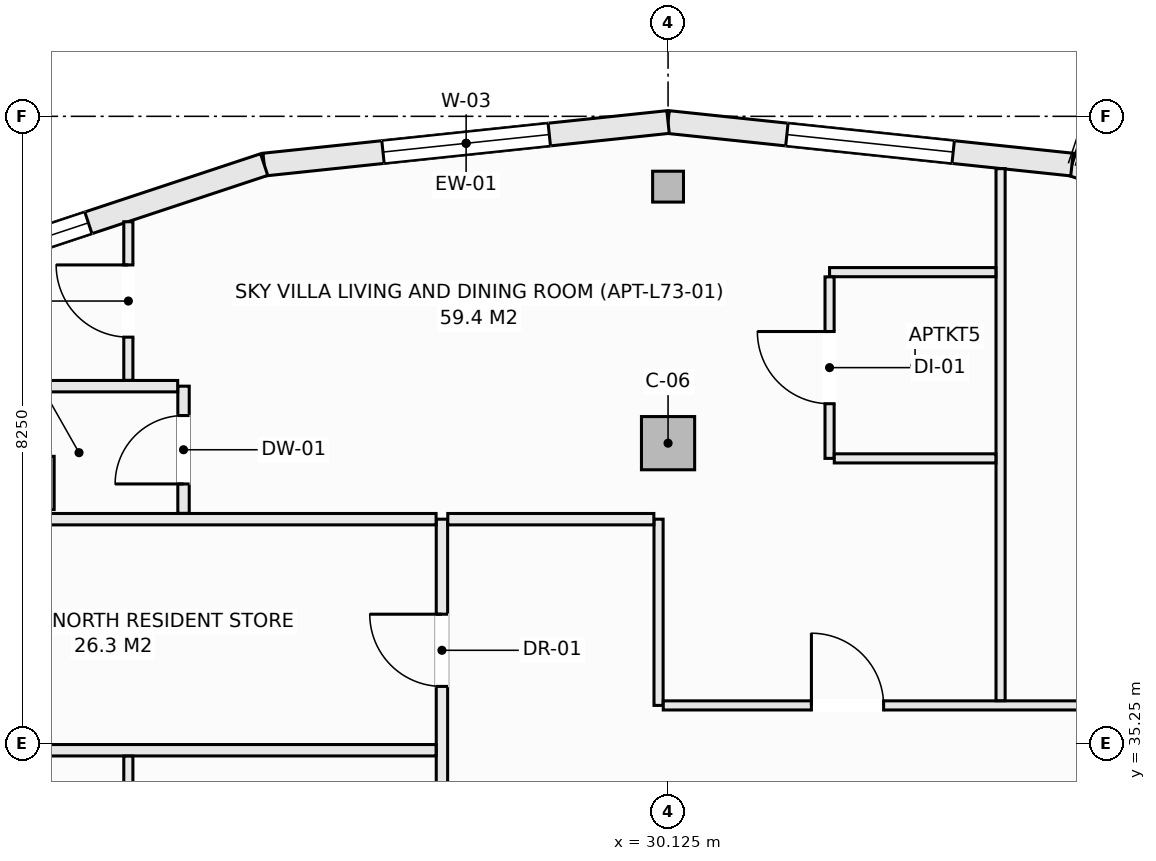
"""IFC4 building model, lengths in metres.
Left out: names, types, materials, properties, quantities, classifications, styles, units other than length and angle.
Written with IfcOpenShell. Run it as: python <this file> out.ifc"""

import sys

from ifc_helpers import new_model, si_unit, direction, frame, frame_2d, origin, origin_2d, place, context, subcontext, project, spatial, rectangle, hollow_rectangle, extrude, element, fill, save


model = new_model("IFC4")
c1 = context("Model", 3, precision=1e-05, world=origin(), true_north=direction((0.0, 1.0)))
c2 = subcontext(c1, "Body", "Model", "MODEL_VIEW")
j1 = project(units=[si_unit("LENGTHUNIT", "METRE"), si_unit("PLANEANGLEUNIT", "RADIAN")], contexts=[c1])
p1 = place(None, origin())
s1 = spatial("IfcSite", under=j1, at=p1, CompositionType="ELEMENT")
p2 = place(p1, origin())
s2 = spatial("IfcBuilding", under=s1, at=p2, CompositionType="ELEMENT")
p3 = place(p2, frame((0.0, 0.0, 269.0)))
s3 = spatial("IfcBuildingStorey", under=s2, at=p3, CompositionType="ELEMENT", Elevation=269.0)
p4 = place(p3, frame((30.125, 42.575, -0.27), z_axis=(0.0, 0.0, 1.0), x_axis=(1.0, 0.0, 0.0)))
e1 = element("IfcColumn", 1, at=p4, inside=s3, PredefinedType="COLUMN", context=c2, shape_type="SweptSolid", body=[
    extrude(hollow_rectangle(XDim=0.406, YDim=0.406, WallThickness=0.016, at=origin_2d()), origin(), (0.0, 0.0, 1.0), 3.3),
])
for number, where, z_axis, x_axis in (
    (2, (30.125, 39.2, -0.27), (0.0, 0.0, 1.0), (1.0, 0.0, 0.0)),
    (3, (21.698, 38.677, -0.27), (0.0, 0.0, 1.0), (1.0, 0.0, 0.0)),
):
    element("IfcColumn", number, at=place(p3, frame(where, z_axis=z_axis, x_axis=x_axis)), inside=s3, PredefinedType="COLUMN", context=c2, shape_type="SweptSolid", body=[
        extrude(rectangle(XDim=0.7, YDim=0.7, at=origin_2d()), origin(), (0.0, 0.0, 1.0), 3.3),
    ])
p5 = place(p3, frame((35.439, 42.865, 0.0), z_axis=(0.0, 0.0, 1.0), x_axis=(0.949252744709, -0.314514271001, 0.0)))
e4 = element("IfcWall", 4, at=p5, inside=s3, PredefinedType="SOLIDWALL", context=c2, shape_type="SweptSolid", body=[
    extrude(rectangle(XDim=5.216, YDim=0.3, at=frame_2d((2.608, 0.0))), origin(), (0.0, 0.0, 1.0), 2.605),
])
p6 = place(p5, frame((1.508, 0.0, 0.72)))
e5 = element("IfcOpeningElement", 5, at=p6, cuts=e4, PredefinedType="OPENING", context=c2, shape_type="SweptSolid", body=[
    extrude(rectangle(XDim=2.2, YDim=1.65, at=frame_2d((1.1, 0.825))), frame((0.0, 0.16, 0.0), z_axis=(0.0, -1.0, 0.0), x_axis=(1.0, 0.0, 0.0)), (0.0, 0.0, 1.0), 0.32),
])
p7 = place(p3, frame((30.125, 43.425, 0.0), z_axis=(0.0, 0.0, 1.0), x_axis=(0.9944966869, -0.104768028258, 0.0)))
e6 = element("IfcWall", 6, at=p7, inside=s3, PredefinedType="SOLIDWALL", context=c2, shape_type="SweptSolid", body=[
    extrude(rectangle(XDim=5.343, YDim=0.3, at=frame_2d((2.672, 0.0))), origin(), (0.0, 0.0, 1.0), 2.605),
])
p8 = place(p7, frame((1.572, 0.0, 0.72)))
e7 = element("IfcOpeningElement", 7, at=p8, cuts=e6, PredefinedType="OPENING", context=c2, shape_type="SweptSolid", body=[
    extrude(rectangle(XDim=2.2, YDim=1.65, at=frame_2d((1.1, 0.825))), frame((0.0, 0.16, 0.0), z_axis=(0.0, -1.0, 0.0), x_axis=(1.0, 0.0, 0.0)), (0.0, 0.0, 1.0), 0.32),
])
p9 = place(p3, frame((24.811, 42.865, 0.0), z_axis=(0.0, 0.0, 1.0), x_axis=(0.9944966869, 0.104768028258, 0.0)))
e8 = element("IfcWall", 8, at=p9, inside=s3, PredefinedType="SOLIDWALL", context=c2, shape_type="SweptSolid", body=[
    extrude(rectangle(XDim=5.343, YDim=0.3, at=frame_2d((2.672, 0.0))), origin(), (0.0, 0.0, 1.0), 2.605),
])
p10 = place(p9, frame((1.572, 0.0, 0.72)))
e9 = element("IfcOpeningElement", 9, at=p10, cuts=e8, PredefinedType="OPENING", context=c2, shape_type="SweptSolid", body=[
    extrude(rectangle(XDim=2.2, YDim=1.65, at=frame_2d((1.1, 0.825))), frame((0.0, 0.16, 0.0), z_axis=(0.0, -1.0, 0.0), x_axis=(1.0, 0.0, 0.0)), (0.0, 0.0, 1.0), 0.32),
])
p11 = place(p3, frame((19.859, 41.225, 0.0), z_axis=(0.0, 0.0, 1.0), x_axis=(0.949252744709, 0.314514271001, 0.0)))
e10 = element("IfcWall", 10, at=p11, inside=s3, PredefinedType="SOLIDWALL", context=c2, shape_type="SweptSolid", body=[
    extrude(rectangle(XDim=5.216, YDim=0.3, at=frame_2d((2.608, 0.0))), origin(), (0.0, 0.0, 1.0), 2.605),
])
p12 = place(p11, frame((1.58, 0.0, 0.72)))
e11 = element("IfcOpeningElement", 11, at=p12, cuts=e10, PredefinedType="OPENING", context=c2, shape_type="SweptSolid", body=[
    extrude(rectangle(XDim=1.2, YDim=1.65, at=frame_2d((0.6, 0.825))), frame((0.0, 0.16, 0.0), z_axis=(0.0, -1.0, 0.0), x_axis=(1.0, 0.0, 0.0)), (0.0, 0.0, 1.0), 0.32),
])
p13 = place(p3, frame((27.15, 34.002, 0.0), z_axis=(0.0, 0.0, 1.0), x_axis=(0.0, 1.0, 0.0)))
e12 = element("IfcWall", 12, at=p13, inside=s3, PredefinedType="PARTITIONING", context=c2, shape_type="SweptSolid", body=[
    extrude(rectangle(XDim=4.198, YDim=0.15, at=frame_2d((2.099, 0.0))), origin(), (0.0, 0.0, 1.0), 3.03),
])
p14 = place(p13, frame((1.998, 0.0, 0.0)))
e13 = element("IfcOpeningElement", 13, at=p14, cuts=e12, PredefinedType="OPENING", context=c2, shape_type="SweptSolid", body=[
    extrude(rectangle(XDim=0.95, YDim=2.1, at=frame_2d((0.475, 1.05))), frame((0.0, 0.085, 0.0), z_axis=(0.0, -1.0, 0.0), x_axis=(1.0, 0.0, 0.0)), (0.0, 0.0, 1.0), 0.17),
])
p15 = place(p3, frame((30.0, 35.75, 0.0), z_axis=(0.0, 0.0, 1.0), x_axis=(0.0, 1.0, 0.0)))
e14 = element("IfcWall", 14, at=p15, inside=s3, PredefinedType="PARTITIONING", context=c2, shape_type="SweptSolid", body=[
    extrude(rectangle(XDim=2.45, YDim=0.12, at=frame_2d((1.225, 0.0))), origin(), (0.0, 0.0, 1.0), 3.03),
])
p16 = place(p3, frame((18.5, 35.16, 0.0), z_axis=(0.0, 0.0, 1.0), x_axis=(1.0, 0.0, 0.0)))
e15 = element("IfcWall", 15, at=p16, inside=s3, PredefinedType="PARTITIONING", context=c2, shape_type="SweptSolid", body=[
    extrude(rectangle(XDim=8.573, YDim=0.15, at=frame_2d((4.287, 0.0))), origin(), (0.0, 0.0, 1.0), 3.03),
])
p17 = place(p3, frame((18.577, 38.2, 0.0), z_axis=(0.0, 0.0, 1.0), x_axis=(1.0, 0.0, 0.0)))
e16 = element("IfcWall", 16, at=p17, inside=s3, PredefinedType="PARTITIONING", context=c2, shape_type="SweptSolid", body=[
    extrude(rectangle(XDim=8.496, YDim=0.15, at=frame_2d((4.248, 0.0))), origin(), (0.0, 0.0, 1.0), 3.03),
])
p18 = place(p3, frame((27.227, 38.2, 0.0), z_axis=(0.0, 0.0, 1.0), x_axis=(1.0, 0.0, 0.0)))
e17 = element("IfcWall", 17, at=p18, inside=s3, PredefinedType="PARTITIONING", context=c2, shape_type="SweptSolid", body=[
    extrude(rectangle(XDim=2.711, YDim=0.15, at=frame_2d((1.355, 0.0))), origin(), (0.0, 0.0, 1.0), 3.03),
])
p19 = place(p3, frame((30.062, 35.75, 0.0), z_axis=(0.0, 0.0, 1.0), x_axis=(1.0, 0.0, 0.0)))
e18 = element("IfcWall", 18, at=p19, inside=s3, PredefinedType="PARTITIONING", context=c2, shape_type="SweptSolid", body=[
    extrude(rectangle(XDim=8.988, YDim=0.12, at=frame_2d((4.494, 0.0))), origin(), (0.0, 0.0, 1.0), 2.478),
])
p20 = place(p19, frame((5.473, 0.0, 0.0)))
e19 = element("IfcOpeningElement", 19, at=p20, cuts=e18, PredefinedType="OPENING", context=c2, shape_type="SweptSolid", body=[
    extrude(rectangle(XDim=0.95, YDim=2.1, at=frame_2d((0.475, 1.05))), frame((0.0, 0.07, 0.0), z_axis=(0.0, -1.0, 0.0), x_axis=(1.0, 0.0, 0.0)), (0.0, 0.0, 1.0), 0.14),
])
p21 = place(p19, frame((1.949, 0.0, 0.0)))
e20 = element("IfcOpeningElement", 20, at=p21, cuts=e18, PredefinedType="OPENING", context=c2, shape_type="SweptSolid", body=[
    extrude(rectangle(XDim=0.95, YDim=2.1, at=frame_2d((0.475, 1.05))), frame((0.0, 0.07, 0.0), z_axis=(0.0, -1.0, 0.0), x_axis=(1.0, 0.0, 0.0)), (0.0, 0.0, 1.0), 0.14),
])
p22 = place(p3, frame((34.5, 35.812, 0.0), z_axis=(0.0, 0.0, 1.0), x_axis=(0.0, 1.0, 0.0)))
e21 = element("IfcWall", 21, at=p22, inside=s3, PredefinedType="PARTITIONING", context=c2, shape_type="SweptSolid", body=[
    extrude(rectangle(XDim=6.999, YDim=0.12, at=frame_2d((3.5, 0.0))), origin(), (0.0, 0.0, 1.0), 2.77),
])
p23 = place(p3, frame((32.25, 41.45, 0.0), z_axis=(0.0, 0.0, 1.0), x_axis=(1.0, 0.0, 0.0)))
e22 = element("IfcWall", 22, at=p23, inside=s3, PredefinedType="PARTITIONING", context=c2, shape_type="SweptSolid", body=[
    extrude(rectangle(XDim=2.188, YDim=0.12, at=frame_2d((1.094, 0.0))), origin(), (0.0, 0.0, 1.0), 3.03),
])
p24 = place(p3, frame((32.25, 39.0, 0.0), z_axis=(0.0, 0.0, 1.0), x_axis=(0.0, 1.0, 0.0)))
e23 = element("IfcWall", 23, at=p24, inside=s3, PredefinedType="PARTITIONING", context=c2, shape_type="SweptSolid", body=[
    extrude(rectangle(XDim=2.388, YDim=0.12, at=frame_2d((1.194, 0.0))), origin(), (0.0, 0.0, 1.0), 3.03),
])
p25 = place(p24, frame((0.719, 0.0, 0.0)))
e24 = element("IfcOpeningElement", 24, at=p25, cuts=e23, PredefinedType="OPENING", context=c2, shape_type="SweptSolid", body=[
    extrude(rectangle(XDim=0.95, YDim=2.1, at=frame_2d((0.475, 1.05))), frame((0.0, 0.07, 0.0), z_axis=(0.0, -1.0, 0.0), x_axis=(1.0, 0.0, 0.0)), (0.0, 0.0, 1.0), 0.14),
])
p26 = place(p3, frame((32.312, 39.0, 0.0), z_axis=(0.0, 0.0, 1.0), x_axis=(1.0, 0.0, 0.0)))
e25 = element("IfcWall", 25, at=p26, inside=s3, PredefinedType="PARTITIONING", context=c2, shape_type="SweptSolid", body=[
    extrude(rectangle(XDim=2.126, YDim=0.12, at=frame_2d((1.063, 0.0))), origin(), (0.0, 0.0, 1.0), 3.03),
])
p27 = place(p3, frame((23.75, 38.277, 0.0), z_axis=(0.0, 0.0, 1.0), x_axis=(0.0, 1.0, 0.0)))
e26 = element("IfcWall", 26, at=p27, inside=s3, PredefinedType="PARTITIONING", context=c2, shape_type="SweptSolid", body=[
    extrude(rectangle(XDim=1.673, YDim=0.15, at=frame_2d((0.836, 0.0))), origin(), (0.0, 0.0, 1.0), 3.03),
])
p28 = place(p27, frame((0.386, 0.0, 0.0)))
e27 = element("IfcOpeningElement", 27, at=p28, cuts=e26, PredefinedType="OPENING", context=c2, shape_type="SweptSolid", body=[
    extrude(rectangle(XDim=0.9, YDim=2.1, at=frame_2d((0.45, 1.05))), frame((0.0, 0.085, 0.0), z_axis=(0.0, -1.0, 0.0), x_axis=(1.0, 0.0, 0.0)), (0.0, 0.0, 1.0), 0.17),
])
p29 = place(p3, frame((21.0, 39.95, 0.0), z_axis=(0.0, 0.0, 1.0), x_axis=(1.0, 0.0, 0.0)))
e28 = element("IfcWall", 28, at=p29, inside=s3, PredefinedType="PARTITIONING", context=c2, shape_type="SweptSolid", body=[
    extrude(rectangle(XDim=2.673, YDim=0.15, at=frame_2d((1.336, 0.0))), origin(), (0.0, 0.0, 1.0), 3.03),
])
p30 = place(p3, frame((23.024, 34.002, 0.0), z_axis=(0.0, 0.0, 1.0), x_axis=(0.0, 1.0, 0.0)))
e29 = element("IfcWall", 29, at=p30, inside=s3, PredefinedType="PARTITIONING", context=c2, shape_type="SweptSolid", body=[
    extrude(rectangle(XDim=1.081, YDim=0.12, at=frame_2d((0.541, 0.0))), origin(), (0.0, 0.0, 1.0), 3.03),
])
p31 = place(p3, frame((23.024, 40.027, 0.0), z_axis=(0.0, 0.0, 1.0), x_axis=(0.0, 1.0, 0.0)))
e30 = element("IfcWall", 30, at=p31, inside=s3, PredefinedType="PARTITIONING", context=c2, shape_type="SweptSolid", body=[
    extrude(rectangle(XDim=2.086, YDim=0.12, at=frame_2d((1.043, 0.0))), origin(), (0.0, 0.0, 1.0), 3.03),
])
p32 = place(p31, frame((0.568, 0.0, 0.0)))
e31 = element("IfcOpeningElement", 31, at=p32, cuts=e30, PredefinedType="OPENING", context=c2, shape_type="SweptSolid", body=[
    extrude(rectangle(XDim=0.95, YDim=2.1, at=frame_2d((0.475, 1.05))), frame((0.0, 0.07, 0.0), z_axis=(0.0, -1.0, 0.0), x_axis=(1.0, 0.0, 0.0)), (0.0, 0.0, 1.0), 0.14),
])
p33 = place(p8, origin())
e32 = element("IfcWindow", 32, at=p33, inside=s3, PartitioningType="SINGLE_PANEL", PredefinedType="WINDOW", context=c2, shape_type="SweptSolid", body=[
    extrude(rectangle(XDim=2.2, YDim=1.65, at=frame_2d((1.1, 0.825))), frame((0.0, 0.03, 0.0), z_axis=(0.0, -1.0, 0.0), x_axis=(1.0, 0.0, 0.0)), (0.0, 0.0, 1.0), 0.06),
])
fill(e7, e32)
p34 = place(p10, origin())
e33 = element("IfcWindow", 33, at=p34, inside=s3, PartitioningType="SINGLE_PANEL", PredefinedType="WINDOW", context=c2, shape_type="SweptSolid", body=[
    extrude(rectangle(XDim=2.2, YDim=1.65, at=frame_2d((1.1, 0.825))), frame((0.0, 0.03, 0.0), z_axis=(0.0, -1.0, 0.0), x_axis=(1.0, 0.0, 0.0)), (0.0, 0.0, 1.0), 0.06),
])
fill(e9, e33)
p35 = place(p12, origin())
e34 = element("IfcWindow", 34, at=p35, inside=s3, PartitioningType="SINGLE_PANEL", PredefinedType="WINDOW", context=c2, shape_type="SweptSolid", body=[
    extrude(rectangle(XDim=1.2, YDim=1.65, at=frame_2d((0.6, 0.825))), frame((0.0, 0.03, 0.0), z_axis=(0.0, -1.0, 0.0), x_axis=(1.0, 0.0, 0.0)), (0.0, 0.0, 1.0), 0.06),
])
fill(e11, e34)
p36 = place(p14, origin())
e35 = element("IfcDoor", 35, at=p36, inside=s3, OperationType="SINGLE_SWING_RIGHT", PredefinedType="DOOR", context=c2, shape_type="SweptSolid", body=[
    extrude(rectangle(XDim=0.95, YDim=2.1, at=frame_2d((0.475, 1.05))), frame((0.0, 0.025, 0.0), z_axis=(0.0, -1.0, 0.0), x_axis=(1.0, 0.0, 0.0)), (0.0, 0.0, 1.0), 0.05),
])
fill(e13, e35)
p37 = place(p21, origin())
e36 = element("IfcDoor", 36, at=p37, inside=s3, OperationType="SINGLE_SWING_LEFT", PredefinedType="DOOR", context=c2, shape_type="SweptSolid", body=[
    extrude(rectangle(XDim=0.95, YDim=2.1, at=frame_2d((0.475, 1.05))), frame((0.0, 0.025, 0.0), z_axis=(0.0, -1.0, 0.0), x_axis=(1.0, 0.0, 0.0)), (0.0, 0.0, 1.0), 0.05),
])
fill(e20, e36)
p38 = place(p25, origin())
e37 = element("IfcDoor", 37, at=p38, inside=s3, OperationType="SINGLE_SWING_RIGHT", PredefinedType="DOOR", context=c2, shape_type="SweptSolid", body=[
    extrude(rectangle(XDim=0.95, YDim=2.1, at=frame_2d((0.475, 1.05))), frame((0.0, 0.025, 0.0), z_axis=(0.0, -1.0, 0.0), x_axis=(1.0, 0.0, 0.0)), (0.0, 0.0, 1.0), 0.05),
])
fill(e24, e37)
p39 = place(p28, origin())
e38 = element("IfcDoor", 38, at=p39, inside=s3, OperationType="SINGLE_SWING_LEFT", PredefinedType="DOOR", context=c2, shape_type="SweptSolid", body=[
    extrude(rectangle(XDim=0.9, YDim=2.1, at=frame_2d((0.45, 1.05))), frame((0.0, 0.025, 0.0), z_axis=(0.0, -1.0, 0.0), x_axis=(1.0, 0.0, 0.0)), (0.0, 0.0, 1.0), 0.05),
])
fill(e27, e38)
p40 = place(p32, origin())
e39 = element("IfcDoor", 39, at=p40, inside=s3, OperationType="SINGLE_SWING_RIGHT", PredefinedType="DOOR", context=c2, shape_type="SweptSolid", body=[
    extrude(rectangle(XDim=0.95, YDim=2.1, at=frame_2d((0.475, 1.05))), frame((0.0, 0.025, 0.0), z_axis=(0.0, -1.0, 0.0), x_axis=(1.0, 0.0, 0.0)), (0.0, 0.0, 1.0), 0.05),
])
fill(e31, e39)
save(model, sys.argv[1])
